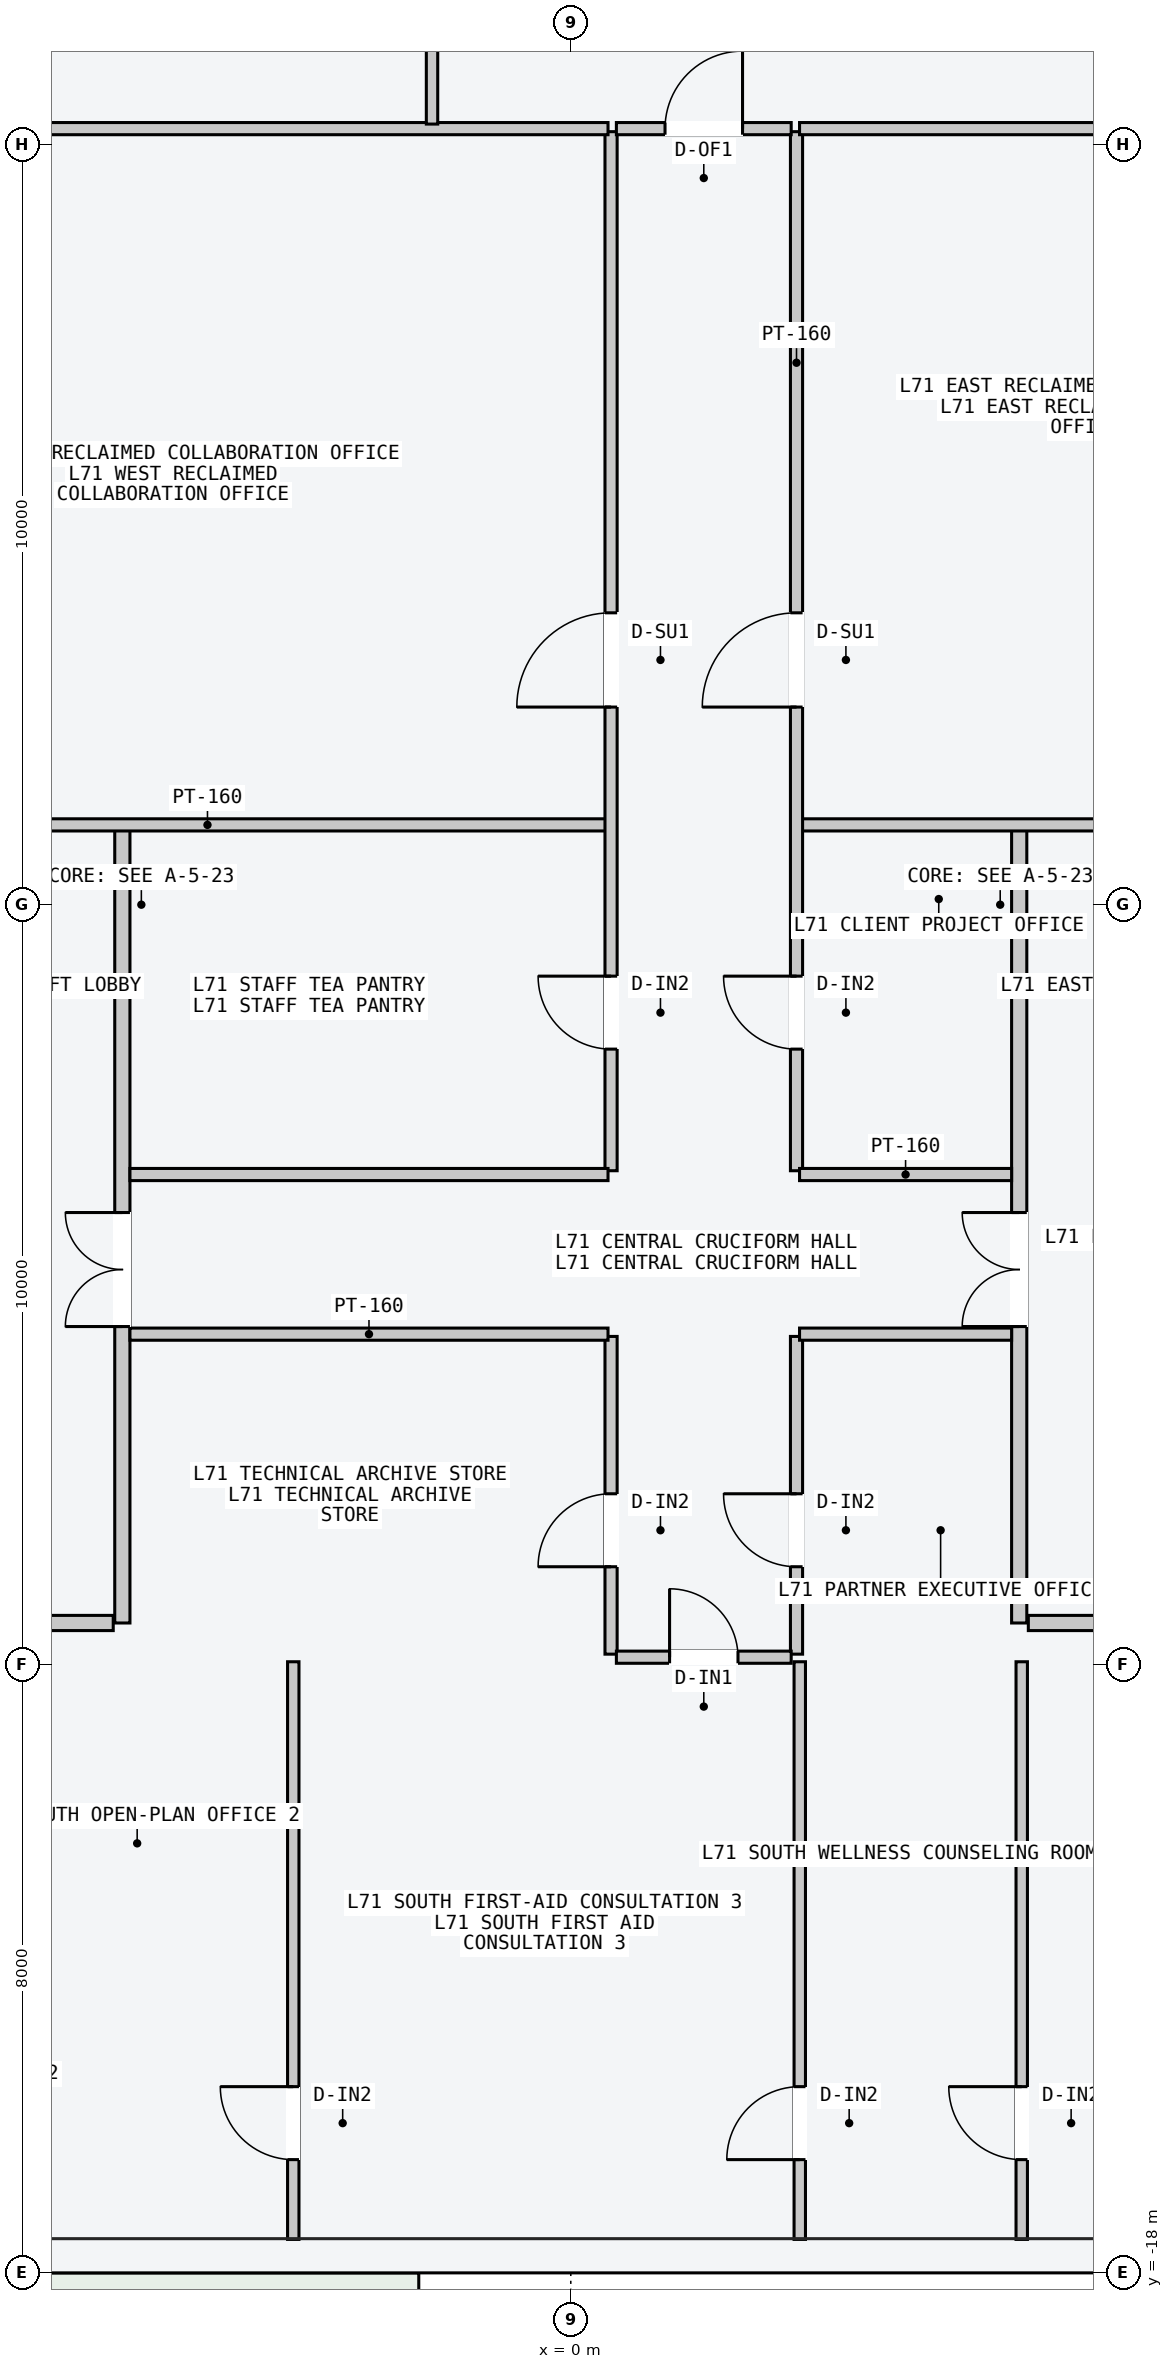
"""IFC4 building model, lengths in metres.
Left out: names, types, materials, properties, quantities, classifications, styles, units other than length and angle.
Written with IfcOpenShell. Run it as: python <this file> out.ifc"""

import sys

from ifc_helpers import new_model, si_unit, direction, frame, frame_2d, origin, place, context, subcontext, project, spatial, rectangle, extrude, element, fill, save


model = new_model("IFC4")
c1 = context("Model", 3, precision=1e-05, world=origin(), true_north=direction((0.0, 1.0)))
c2 = subcontext(c1, "Body", "Model", "MODEL_VIEW")
j1 = project(units=[si_unit("LENGTHUNIT", "METRE"), si_unit("PLANEANGLEUNIT", "RADIAN")], contexts=[c1])
p1 = place(None, origin())
s1 = spatial("IfcSite", under=j1, at=p1, CompositionType="ELEMENT")
p2 = place(p1, origin())
s2 = spatial("IfcBuilding", under=s1, at=p2, CompositionType="ELEMENT")
p3 = place(p2, frame((0.0, 0.0, 268.8)))
s3 = spatial("IfcBuildingStorey", under=s2, at=p3, CompositionType="ELEMENT", Elevation=268.8)
p4 = place(p3, frame((-5.9, -9.45, 0.0), z_axis=(0.0, 0.0, 1.0), x_axis=(0.0, 1.0, 0.0)))
e1 = element("IfcWall", 1, at=p4, inside=s3, PredefinedType="PARTITIONING", context=c2, shape_type="SweptSolid", body=[
    extrude(rectangle(XDim=10.5, YDim=0.2, at=frame_2d((5.25, 0.0))), origin(), (0.0, 0.0, 1.0), 3.4),
])
p5 = place(p4, frame((3.9, 0.0, 0.0)))
e2 = element("IfcOpeningElement", 2, at=p5, cuts=e1, PredefinedType="OPENING", context=c2, shape_type="SweptSolid", body=[
    extrude(rectangle(XDim=1.5, YDim=2.2, at=frame_2d((0.75, 1.1))), frame((0.0, 0.11, 0.0), z_axis=(0.0, -1.0, 0.0), x_axis=(1.0, 0.0, 0.0)), (0.0, 0.0, 1.0), 0.22),
])
p6 = place(p3, frame((-6.02, -9.45, 0.0), z_axis=(0.0, 0.0, 1.0), x_axis=(-1.0, 0.0, 0.0)))
e3 = element("IfcWall", 3, at=p6, inside=s3, PredefinedType="PARTITIONING", context=c2, shape_type="SweptSolid", body=[
    extrude(rectangle(XDim=1.8, YDim=0.2, at=frame_2d((0.9, 0.0))), origin(), (0.0, 0.0, 1.0), 3.4),
])
p7 = place(p3, frame((5.9, -9.45, 0.0), z_axis=(0.0, 0.0, 1.0), x_axis=(0.0, 1.0, 0.0)))
e4 = element("IfcWall", 4, at=p7, inside=s3, PredefinedType="PARTITIONING", context=c2, shape_type="SweptSolid", body=[
    extrude(rectangle(XDim=10.5, YDim=0.2, at=frame_2d((5.25, 0.0))), origin(), (0.0, 0.0, 1.0), 3.4),
])
p8 = place(p7, frame((3.9, 0.0, 0.0)))
e5 = element("IfcOpeningElement", 5, at=p8, cuts=e4, PredefinedType="OPENING", context=c2, shape_type="SweptSolid", body=[
    extrude(rectangle(XDim=1.5, YDim=2.2, at=frame_2d((0.75, 1.1))), frame((0.0, 0.11, 0.0), z_axis=(0.0, -1.0, 0.0), x_axis=(1.0, 0.0, 0.0)), (0.0, 0.0, 1.0), 0.22),
])
p9 = place(p3, frame((6.02, -9.45, 0.0), z_axis=(0.0, 0.0, 1.0), x_axis=(1.0, 0.0, 0.0)))
e6 = element("IfcWall", 6, at=p9, inside=s3, PredefinedType="PARTITIONING", context=c2, shape_type="SweptSolid", body=[
    extrude(rectangle(XDim=1.8, YDim=0.2, at=frame_2d((0.9, 0.0))), origin(), (0.0, 0.0, 1.0), 3.4),
])
p10 = place(p3, frame((-10.05, 1.05, 0.0), z_axis=(0.0, 0.0, 1.0), x_axis=(1.0, 0.0, 0.0)))
e7 = element("IfcWall", 7, at=p10, inside=s3, PredefinedType="PARTITIONING", context=c2, shape_type="SweptSolid", body=[
    extrude(rectangle(XDim=10.54, YDim=0.16, at=frame_2d((5.27, 0.0))), origin(), (0.0, 0.0, 1.0), 3.4),
])
p11 = place(p3, frame((0.53, -3.5, 0.0), z_axis=(0.0, 0.0, 1.0), x_axis=(0.0, 1.0, 0.0)))
e8 = element("IfcWall", 8, at=p11, inside=s3, PredefinedType="PARTITIONING", context=c2, shape_type="SweptSolid", body=[
    extrude(rectangle(XDim=13.67, YDim=0.16, at=frame_2d((6.835, 0.0))), origin(), (0.0, 0.0, 1.0), 3.4),
])
p12 = place(p11, frame((6.1, 0.0, 0.0)))
e9 = element("IfcOpeningElement", 9, at=p12, cuts=e8, PredefinedType="OPENING", context=c2, shape_type="SweptSolid", body=[
    extrude(rectangle(XDim=1.24, YDim=2.24, at=frame_2d((0.62, 1.12))), frame((0.0, 0.09, 0.0), z_axis=(0.0, -1.0, 0.0), x_axis=(1.0, 0.0, 0.0)), (0.0, 0.0, 1.0), 0.18),
])
p13 = place(p11, frame((1.6, 0.0, 0.0)))
e10 = element("IfcOpeningElement", 10, at=p13, cuts=e8, PredefinedType="OPENING", context=c2, shape_type="SweptSolid", body=[
    extrude(rectangle(XDim=0.96, YDim=2.18, at=frame_2d((0.48, 1.09))), frame((0.0, 0.09, 0.0), z_axis=(0.0, -1.0, 0.0), x_axis=(1.0, 0.0, 0.0)), (0.0, 0.0, 1.0), 0.18),
])
p14 = place(p3, frame((-7.5, 10.21, 0.0), z_axis=(0.0, 0.0, 1.0), x_axis=(1.0, 0.0, 0.0)))
e11 = element("IfcWall", 11, at=p14, inside=s3, PredefinedType="PARTITIONING", context=c2, shape_type="SweptSolid", body=[
    extrude(rectangle(XDim=7.99, YDim=0.16, at=frame_2d((3.995, 0.0))), origin(), (0.0, 0.0, 1.0), 3.4),
])
p15 = place(p3, frame((-5.8, -3.55, 0.0), z_axis=(0.0, 0.0, 1.0), x_axis=(1.0, 0.0, 0.0)))
e12 = element("IfcWall", 12, at=p15, inside=s3, PredefinedType="PARTITIONING", context=c2, shape_type="SweptSolid", body=[
    extrude(rectangle(XDim=6.29, YDim=0.16, at=frame_2d((3.145, 0.0))), origin(), (0.0, 0.0, 1.0), 3.4),
])
p16 = place(p3, frame((3.01, 1.05, 0.0), z_axis=(0.0, 0.0, 1.0), x_axis=(1.0, 0.0, 0.0)))
e13 = element("IfcWall", 13, at=p16, inside=s3, PredefinedType="PARTITIONING", context=c2, shape_type="SweptSolid", body=[
    extrude(rectangle(XDim=7.05, YDim=0.16, at=frame_2d((3.525, 0.0))), origin(), (0.0, 0.0, 1.0), 3.4),
])
p17 = place(p3, frame((2.97, -3.5, 0.0), z_axis=(0.0, 0.0, 1.0), x_axis=(0.0, 1.0, 0.0)))
e14 = element("IfcWall", 14, at=p17, inside=s3, PredefinedType="PARTITIONING", context=c2, shape_type="SweptSolid", body=[
    extrude(rectangle(XDim=13.67, YDim=0.16, at=frame_2d((6.835, 0.0))), origin(), (0.0, 0.0, 1.0), 3.4),
])
p18 = place(p17, frame((6.1, 0.0, 0.0)))
e15 = element("IfcOpeningElement", 15, at=p18, cuts=e14, PredefinedType="OPENING", context=c2, shape_type="SweptSolid", body=[
    extrude(rectangle(XDim=1.24, YDim=2.24, at=frame_2d((0.62, 1.12))), frame((0.0, 0.09, 0.0), z_axis=(0.0, -1.0, 0.0), x_axis=(1.0, 0.0, 0.0)), (0.0, 0.0, 1.0), 0.18),
])
p19 = place(p17, frame((1.6, 0.0, 0.0)))
e16 = element("IfcOpeningElement", 16, at=p19, cuts=e14, PredefinedType="OPENING", context=c2, shape_type="SweptSolid", body=[
    extrude(rectangle(XDim=0.96, YDim=2.18, at=frame_2d((0.48, 1.09))), frame((0.0, 0.09, 0.0), z_axis=(0.0, -1.0, 0.0), x_axis=(1.0, 0.0, 0.0)), (0.0, 0.0, 1.0), 0.18),
])
p20 = place(p3, frame((3.01, 10.21, 0.0), z_axis=(0.0, 0.0, 1.0), x_axis=(1.0, 0.0, 0.0)))
e17 = element("IfcWall", 17, at=p20, inside=s3, PredefinedType="PARTITIONING", context=c2, shape_type="SweptSolid", body=[
    extrude(rectangle(XDim=4.49, YDim=0.16, at=frame_2d((2.245, 0.0))), origin(), (0.0, 0.0, 1.0), 3.4),
])
p21 = place(p3, frame((3.01, -3.55, 0.0), z_axis=(0.0, 0.0, 1.0), x_axis=(1.0, 0.0, 0.0)))
e18 = element("IfcWall", 18, at=p21, inside=s3, PredefinedType="PARTITIONING", context=c2, shape_type="SweptSolid", body=[
    extrude(rectangle(XDim=2.79, YDim=0.16, at=frame_2d((1.395, 0.0))), origin(), (0.0, 0.0, 1.0), 3.4),
])
p22 = place(p3, frame((0.53, -9.86, 0.0), z_axis=(0.0, 0.0, 1.0), x_axis=(0.0, 1.0, 0.0)))
e19 = element("IfcWall", 19, at=p22, inside=s3, PredefinedType="PARTITIONING", context=c2, shape_type="SweptSolid", body=[
    extrude(rectangle(XDim=4.18, YDim=0.16, at=frame_2d((2.09, 0.0))), origin(), (0.0, 0.0, 1.0), 3.4),
])
p23 = place(p22, frame((1.15, 0.0, 0.0)))
e20 = element("IfcOpeningElement", 20, at=p23, cuts=e19, PredefinedType="OPENING", context=c2, shape_type="SweptSolid", body=[
    extrude(rectangle(XDim=0.96, YDim=2.18, at=frame_2d((0.48, 1.09))), frame((0.0, 0.09, 0.0), z_axis=(0.0, -1.0, 0.0), x_axis=(1.0, 0.0, 0.0)), (0.0, 0.0, 1.0), 0.18),
])
p24 = place(p3, frame((2.97, -9.86, 0.0), z_axis=(0.0, 0.0, 1.0), x_axis=(0.0, 1.0, 0.0)))
e21 = element("IfcWall", 21, at=p24, inside=s3, PredefinedType="PARTITIONING", context=c2, shape_type="SweptSolid", body=[
    extrude(rectangle(XDim=4.18, YDim=0.16, at=frame_2d((2.09, 0.0))), origin(), (0.0, 0.0, 1.0), 3.4),
])
p25 = place(p24, frame((1.15, 0.0, 0.0)))
e22 = element("IfcOpeningElement", 22, at=p25, cuts=e21, PredefinedType="OPENING", context=c2, shape_type="SweptSolid", body=[
    extrude(rectangle(XDim=0.96, YDim=2.18, at=frame_2d((0.48, 1.09))), frame((0.0, 0.09, 0.0), z_axis=(0.0, -1.0, 0.0), x_axis=(1.0, 0.0, 0.0)), (0.0, 0.0, 1.0), 0.18),
])
p26 = place(p3, frame((-5.8, -5.65, 0.0), z_axis=(0.0, 0.0, 1.0), x_axis=(1.0, 0.0, 0.0)))
e23 = element("IfcWall", 23, at=p26, inside=s3, PredefinedType="PARTITIONING", context=c2, shape_type="SweptSolid", body=[
    extrude(rectangle(XDim=6.29, YDim=0.16, at=frame_2d((3.145, 0.0))), origin(), (0.0, 0.0, 1.0), 3.4),
])
p27 = place(p3, frame((3.01, -5.65, 0.0), z_axis=(0.0, 0.0, 1.0), x_axis=(1.0, 0.0, 0.0)))
e24 = element("IfcWall", 24, at=p27, inside=s3, PredefinedType="PARTITIONING", context=c2, shape_type="SweptSolid", body=[
    extrude(rectangle(XDim=2.79, YDim=0.16, at=frame_2d((1.395, 0.0))), origin(), (0.0, 0.0, 1.0), 3.4),
])
p28 = place(p3, frame((-1.826, 10.27, 0.0), z_axis=(0.0, 0.0, 1.0), x_axis=(0.0, 1.0, 0.0)))
e25 = element("IfcWall", 25, at=p28, inside=s3, PredefinedType="PARTITIONING", context=c2, shape_type="SweptSolid", body=[
    extrude(rectangle(XDim=7.29, YDim=0.15, at=frame_2d((3.645, 0.0))), origin(), (0.0, 0.0, 1.0), 3.4),
])
p29 = place(p28, frame((1.15, 0.0, 0.0)))
e26 = element("IfcOpeningElement", 26, at=p29, cuts=e25, PredefinedType="OPENING", context=c2, shape_type="SweptSolid", body=[
    extrude(rectangle(XDim=0.96, YDim=2.18, at=frame_2d((0.48, 1.09))), frame((0.0, 0.085, 0.0), z_axis=(0.0, -1.0, 0.0), x_axis=(1.0, 0.0, 0.0)), (0.0, 0.0, 1.0), 0.17),
])
p30 = place(p3, frame((0.6, 10.21, 0.0), z_axis=(0.0, 0.0, 1.0), x_axis=(1.0, 0.0, 0.0)))
e27 = element("IfcWall", 27, at=p30, inside=s3, PredefinedType="PARTITIONING", context=c2, shape_type="SweptSolid", body=[
    extrude(rectangle(XDim=2.3, YDim=0.16, at=frame_2d((1.15, 0.0))), origin(), (0.0, 0.0, 1.0), 3.4),
])
p31 = place(p30, frame((0.64, 0.0, 0.0)))
e28 = element("IfcOpeningElement", 28, at=p31, cuts=e27, PredefinedType="OPENING", context=c2, shape_type="SweptSolid", body=[
    extrude(rectangle(XDim=1.02, YDim=2.2, at=frame_2d((0.51, 1.1))), frame((0.0, 0.09, 0.0), z_axis=(0.0, -1.0, 0.0), x_axis=(1.0, 0.0, 0.0)), (0.0, 0.0, 1.0), 0.18),
])
p32 = place(p3, frame((-3.651, -17.56, 0.0), z_axis=(0.0, 0.0, 1.0), x_axis=(0.0, 1.0, 0.0)))
e29 = element("IfcWall", 29, at=p32, inside=s3, PredefinedType="PARTITIONING", context=c2, shape_type="SweptSolid", body=[
    extrude(rectangle(XDim=7.6, YDim=0.15, at=frame_2d((3.8, 0.0))), origin(), (0.0, 0.0, 1.0), 3.4),
])
p33 = place(p32, frame((1.05, 0.0, 0.0)))
e30 = element("IfcOpeningElement", 30, at=p33, cuts=e29, PredefinedType="OPENING", context=c2, shape_type="SweptSolid", body=[
    extrude(rectangle(XDim=0.96, YDim=2.18, at=frame_2d((0.48, 1.09))), frame((0.0, 0.085, 0.0), z_axis=(0.0, -1.0, 0.0), x_axis=(1.0, 0.0, 0.0)), (0.0, 0.0, 1.0), 0.17),
])
p34 = place(p3, frame((3.013, -17.56, 0.0), z_axis=(0.0, 0.0, 1.0), x_axis=(0.0, 1.0, 0.0)))
e31 = element("IfcWall", 31, at=p34, inside=s3, PredefinedType="PARTITIONING", context=c2, shape_type="SweptSolid", body=[
    extrude(rectangle(XDim=7.6, YDim=0.15, at=frame_2d((3.8, 0.0))), origin(), (0.0, 0.0, 1.0), 3.4),
])
p35 = place(p34, frame((1.05, 0.0, 0.0)))
e32 = element("IfcOpeningElement", 32, at=p35, cuts=e31, PredefinedType="OPENING", context=c2, shape_type="SweptSolid", body=[
    extrude(rectangle(XDim=0.96, YDim=2.18, at=frame_2d((0.48, 1.09))), frame((0.0, 0.085, 0.0), z_axis=(0.0, -1.0, 0.0), x_axis=(1.0, 0.0, 0.0)), (0.0, 0.0, 1.0), 0.17),
])
p36 = place(p3, frame((5.933, -17.56, 0.0), z_axis=(0.0, 0.0, 1.0), x_axis=(0.0, 1.0, 0.0)))
e33 = element("IfcWall", 33, at=p36, inside=s3, PredefinedType="PARTITIONING", context=c2, shape_type="SweptSolid", body=[
    extrude(rectangle(XDim=7.6, YDim=0.15, at=frame_2d((3.8, 0.0))), origin(), (0.0, 0.0, 1.0), 3.4),
])
p37 = place(p36, frame((1.05, 0.0, 0.0)))
e34 = element("IfcOpeningElement", 34, at=p37, cuts=e33, PredefinedType="OPENING", context=c2, shape_type="SweptSolid", body=[
    extrude(rectangle(XDim=0.96, YDim=2.18, at=frame_2d((0.48, 1.09))), frame((0.0, 0.085, 0.0), z_axis=(0.0, -1.0, 0.0), x_axis=(1.0, 0.0, 0.0)), (0.0, 0.0, 1.0), 0.17),
])
p38 = place(p3, frame((0.6, -9.9, 0.0), z_axis=(0.0, 0.0, 1.0), x_axis=(1.0, 0.0, 0.0)))
e35 = element("IfcWall", 35, at=p38, inside=s3, PredefinedType="PARTITIONING", context=c2, shape_type="SweptSolid", body=[
    extrude(rectangle(XDim=2.3, YDim=0.16, at=frame_2d((1.15, 0.0))), origin(), (0.0, 0.0, 1.0), 3.4),
])
p39 = place(p38, frame((0.7, 0.0, 0.0)))
e36 = element("IfcOpeningElement", 36, at=p39, cuts=e35, PredefinedType="OPENING", context=c2, shape_type="SweptSolid", body=[
    extrude(rectangle(XDim=0.9, YDim=2.15, at=frame_2d((0.45, 1.075))), frame((0.0, 0.09, 0.0), z_axis=(0.0, -1.0, 0.0), x_axis=(1.0, 0.0, 0.0)), (0.0, 0.0, 1.0), 0.18),
])
p40 = place(p5, origin())
e37 = element("IfcDoor", 37, at=p40, inside=s3, OperationType="DOUBLE_DOOR_SINGLE_SWING", PredefinedType="DOOR", context=c2, shape_type="SweptSolid", body=[
    extrude(rectangle(XDim=1.5, YDim=2.2, at=frame_2d((0.75, 1.1))), frame((0.0, 0.025, 0.0), z_axis=(0.0, -1.0, 0.0), x_axis=(1.0, 0.0, 0.0)), (0.0, 0.0, 1.0), 0.05),
])
fill(e2, e37)
p41 = place(p8, origin())
e38 = element("IfcDoor", 38, at=p41, inside=s3, OperationType="DOUBLE_DOOR_SINGLE_SWING", PredefinedType="DOOR", context=c2, shape_type="SweptSolid", body=[
    extrude(rectangle(XDim=1.5, YDim=2.2, at=frame_2d((0.75, 1.1))), frame((0.0, 0.025, 0.0), z_axis=(0.0, -1.0, 0.0), x_axis=(1.0, 0.0, 0.0)), (0.0, 0.0, 1.0), 0.05),
])
fill(e5, e38)
p42 = place(p12, origin())
e39 = element("IfcDoor", 39, at=p42, inside=s3, OperationType="SINGLE_SWING_LEFT", PredefinedType="DOOR", context=c2, shape_type="SweptSolid", body=[
    extrude(rectangle(XDim=1.24, YDim=2.24, at=frame_2d((0.62, 1.12))), frame((0.0, 0.025, 0.0), z_axis=(0.0, -1.0, 0.0), x_axis=(1.0, 0.0, 0.0)), (0.0, 0.0, 1.0), 0.05),
])
fill(e9, e39)
p43 = place(p13, origin())
e40 = element("IfcDoor", 40, at=p43, inside=s3, OperationType="SINGLE_SWING_RIGHT", PredefinedType="DOOR", context=c2, shape_type="SweptSolid", body=[
    extrude(rectangle(XDim=0.96, YDim=2.18, at=frame_2d((0.48, 1.09))), frame((0.0, 0.025, 0.0), z_axis=(0.0, -1.0, 0.0), x_axis=(1.0, 0.0, 0.0)), (0.0, 0.0, 1.0), 0.05),
])
fill(e10, e40)
p44 = place(p18, origin())
e41 = element("IfcDoor", 41, at=p44, inside=s3, OperationType="SINGLE_SWING_LEFT", PredefinedType="DOOR", context=c2, shape_type="SweptSolid", body=[
    extrude(rectangle(XDim=1.24, YDim=2.24, at=frame_2d((0.62, 1.12))), frame((0.0, 0.025, 0.0), z_axis=(0.0, -1.0, 0.0), x_axis=(1.0, 0.0, 0.0)), (0.0, 0.0, 1.0), 0.05),
])
fill(e15, e41)
p45 = place(p19, origin())
e42 = element("IfcDoor", 42, at=p45, inside=s3, OperationType="SINGLE_SWING_RIGHT", PredefinedType="DOOR", context=c2, shape_type="SweptSolid", body=[
    extrude(rectangle(XDim=0.96, YDim=2.18, at=frame_2d((0.48, 1.09))), frame((0.0, 0.025, 0.0), z_axis=(0.0, -1.0, 0.0), x_axis=(1.0, 0.0, 0.0)), (0.0, 0.0, 1.0), 0.05),
])
fill(e16, e42)
p46 = place(p23, origin())
e43 = element("IfcDoor", 43, at=p46, inside=s3, OperationType="SINGLE_SWING_LEFT", PredefinedType="DOOR", context=c2, shape_type="SweptSolid", body=[
    extrude(rectangle(XDim=0.96, YDim=2.18, at=frame_2d((0.48, 1.09))), frame((0.0, 0.025, 0.0), z_axis=(0.0, -1.0, 0.0), x_axis=(1.0, 0.0, 0.0)), (0.0, 0.0, 1.0), 0.05),
])
fill(e20, e43)
p47 = place(p25, origin())
e44 = element("IfcDoor", 44, at=p47, inside=s3, OperationType="SINGLE_SWING_RIGHT", PredefinedType="DOOR", context=c2, shape_type="SweptSolid", body=[
    extrude(rectangle(XDim=0.96, YDim=2.18, at=frame_2d((0.48, 1.09))), frame((0.0, 0.025, 0.0), z_axis=(0.0, -1.0, 0.0), x_axis=(1.0, 0.0, 0.0)), (0.0, 0.0, 1.0), 0.05),
])
fill(e22, e44)
p48 = place(p31, origin())
e45 = element("IfcDoor", 45, at=p48, inside=s3, OperationType="SINGLE_SWING_RIGHT", PredefinedType="DOOR", context=c2, shape_type="SweptSolid", body=[
    extrude(rectangle(XDim=1.02, YDim=2.2, at=frame_2d((0.51, 1.1))), frame((0.0, 0.025, 0.0), z_axis=(0.0, -1.0, 0.0), x_axis=(1.0, 0.0, 0.0)), (0.0, 0.0, 1.0), 0.05),
])
fill(e28, e45)
p49 = place(p33, origin())
e46 = element("IfcDoor", 46, at=p49, inside=s3, OperationType="SINGLE_SWING_RIGHT", PredefinedType="DOOR", context=c2, shape_type="SweptSolid", body=[
    extrude(rectangle(XDim=0.96, YDim=2.18, at=frame_2d((0.48, 1.09))), frame((0.0, 0.025, 0.0), z_axis=(0.0, -1.0, 0.0), x_axis=(1.0, 0.0, 0.0)), (0.0, 0.0, 1.0), 0.05),
])
fill(e30, e46)
p50 = place(p35, origin())
e47 = element("IfcDoor", 47, at=p50, inside=s3, OperationType="SINGLE_SWING_LEFT", PredefinedType="DOOR", context=c2, shape_type="SweptSolid", body=[
    extrude(rectangle(XDim=0.96, YDim=2.18, at=frame_2d((0.48, 1.09))), frame((0.0, 0.025, 0.0), z_axis=(0.0, -1.0, 0.0), x_axis=(1.0, 0.0, 0.0)), (0.0, 0.0, 1.0), 0.05),
])
fill(e32, e47)
p51 = place(p37, origin())
e48 = element("IfcDoor", 48, at=p51, inside=s3, OperationType="SINGLE_SWING_RIGHT", PredefinedType="DOOR", context=c2, shape_type="SweptSolid", body=[
    extrude(rectangle(XDim=0.96, YDim=2.18, at=frame_2d((0.48, 1.09))), frame((0.0, 0.025, 0.0), z_axis=(0.0, -1.0, 0.0), x_axis=(1.0, 0.0, 0.0)), (0.0, 0.0, 1.0), 0.05),
])
fill(e34, e48)
p52 = place(p39, origin())
e49 = element("IfcDoor", 49, at=p52, inside=s3, OperationType="SINGLE_SWING_LEFT", PredefinedType="DOOR", context=c2, shape_type="SweptSolid", body=[
    extrude(rectangle(XDim=0.9, YDim=2.15, at=frame_2d((0.45, 1.075))), frame((0.0, 0.025, 0.0), z_axis=(0.0, -1.0, 0.0), x_axis=(1.0, 0.0, 0.0)), (0.0, 0.0, 1.0), 0.05),
])
fill(e36, e49)
save(model, sys.argv[1])
